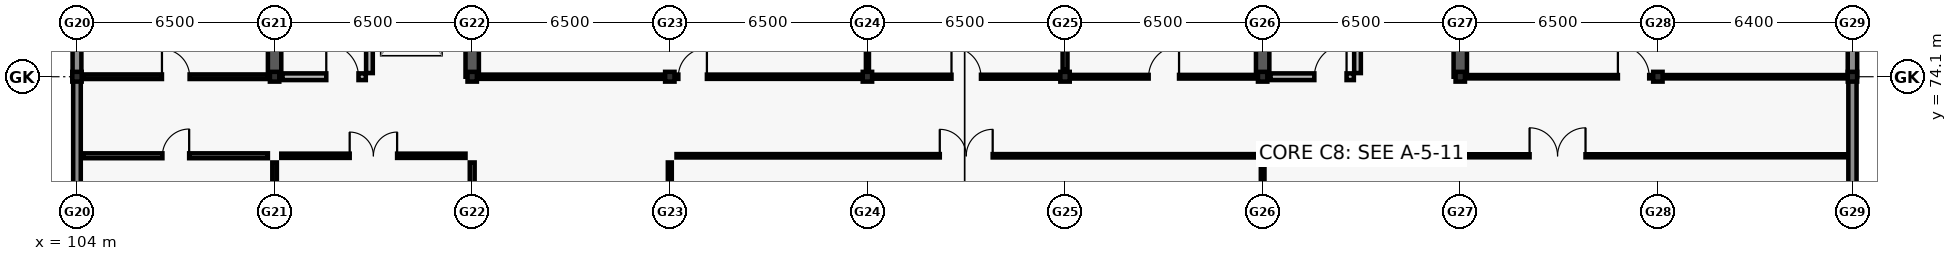
"""IFC4 building model, lengths in metres.
Left out: names, types, materials, properties, quantities, classifications, styles, units other than length and angle.
Written with IfcOpenShell. Run it as: python <this file> out.ifc"""

import sys

from ifc_helpers import new_model, si_unit, direction, frame, frame_2d, origin, origin_2d, place, context, subcontext, project, spatial, rectangle, i_section, extrude, element, fill, save


model = new_model("IFC4")
c1 = context("Model", 3, precision=1e-05, world=origin(), true_north=direction((0.0, 1.0)))
c2 = subcontext(c1, "Body", "Model", "MODEL_VIEW")
j1 = project(units=[si_unit("LENGTHUNIT", "METRE"), si_unit("PLANEANGLEUNIT", "RADIAN")], contexts=[c1])
p1 = place(None, origin())
s1 = spatial("IfcSite", under=j1, at=p1, CompositionType="ELEMENT")
p2 = place(p1, origin())
s2 = spatial("IfcBuilding", under=s1, at=p2, CompositionType="ELEMENT")
p3 = place(p2, frame((0.0, 0.0, 5.4)))
s3 = spatial("IfcBuildingStorey", under=s2, at=p3, CompositionType="ELEMENT", Elevation=5.4)
for number, where, z_axis, x_axis in (
    (1, (104.0, 74.1, 0.0), (0.0, 0.0, 1.0), (1.0, 0.0, 0.0)),
    (2, (110.5, 74.1, 0.0), (0.0, 0.0, 1.0), (1.0, 0.0, 0.0)),
    (3, (117.0, 74.1, 0.0), (0.0, 0.0, 1.0), (1.0, 0.0, 0.0)),
    (4, (123.5, 74.1, 0.0), (0.0, 0.0, 1.0), (1.0, 0.0, 0.0)),
    (5, (130.0, 74.1, 0.0), (0.0, 0.0, 1.0), (1.0, 0.0, 0.0)),
    (6, (136.5, 74.1, 0.0), (0.0, 0.0, 1.0), (1.0, 0.0, 0.0)),
    (7, (143.0, 74.1, 0.0), (0.0, 0.0, 1.0), (1.0, 0.0, 0.0)),
    (8, (149.5, 74.1, 0.0), (0.0, 0.0, 1.0), (1.0, 0.0, 0.0)),
    (9, (156.0, 74.1, 0.0), (0.0, 0.0, 1.0), (1.0, 0.0, 0.0)),
    (10, (162.4, 74.1, 0.0), (0.0, 0.0, 1.0), (1.0, 0.0, 0.0)),
):
    element("IfcColumn", number, at=place(p3, frame(where, z_axis=z_axis, x_axis=x_axis)), inside=s3, PredefinedType="COLUMN", context=c2, shape_type="SweptSolid", body=[
        extrude(i_section(OverallWidth=0.309, OverallDepth=0.321, WebThickness=0.014, FlangeThickness=0.022, FilletRadius=0.017, at=origin_2d()), origin(), (0.0, 0.0, 1.0), 4.2),
    ])
for number, where, z_axis, x_axis in (
    (11, (110.5, 74.1, 0.0), (0.0, 0.0, 1.0), (0.0, 1.0, 0.0)),
    (12, (117.0, 74.1, 0.0), (0.0, 0.0, 1.0), (0.0, 1.0, 0.0)),
    (13, (143.0, 74.1, 0.0), (0.0, 0.0, 1.0), (0.0, 1.0, 0.0)),
    (14, (149.5, 74.1, 0.0), (0.0, 0.0, 1.0), (0.0, 1.0, 0.0)),
):
    element("IfcWall", number, at=place(p3, frame(where, z_axis=z_axis, x_axis=x_axis)), inside=s3, PredefinedType="SHEAR", context=c2, shape_type="SweptSolid", body=[
        extrude(rectangle(XDim=6.68, YDim=0.44, at=frame_2d((3.34, 0.0))), origin(), (0.0, 0.0, 1.0), 3.96),
    ])
p4 = place(p3, frame((104.0, 67.205, 0.0), z_axis=(0.0, 0.0, 1.0), x_axis=(0.0, 1.0, 0.0)))
e15 = element("IfcWall", 15, at=p4, inside=s3, PredefinedType="SOLIDWALL", context=c2, shape_type="SweptSolid", body=[
    extrude(rectangle(XDim=6.89, YDim=0.25, at=frame_2d((3.445, 0.0))), origin(), (0.0, 0.0, 1.0), 3.32),
])
p5 = place(p4, frame((1.512, 0.0, 0.8)))
e16 = element("IfcOpeningElement", 16, at=p5, cuts=e15, PredefinedType="OPENING", context=c2, shape_type="SweptSolid", body=[
    extrude(rectangle(XDim=1.3, YDim=1.8, at=frame_2d((0.65, 0.9))), frame((0.0, 0.135, 0.0), z_axis=(0.0, -1.0, 0.0), x_axis=(1.0, 0.0, 0.0)), (0.0, 0.0, 1.0), 0.27),
])
p6 = place(p3, frame((162.4, 74.095, 0.0), z_axis=(0.0, 0.0, 1.0), x_axis=(0.0, -1.0, 0.0)))
e17 = element("IfcWall", 17, at=p6, inside=s3, PredefinedType="SOLIDWALL", context=c2, shape_type="SweptSolid", body=[
    extrude(rectangle(XDim=6.89, YDim=0.27, at=frame_2d((3.445, 0.0))), origin(), (0.0, 0.0, 1.0), 3.32),
])
p7 = place(p6, frame((4.002, 0.0, 0.8)))
e18 = element("IfcOpeningElement", 18, at=p7, cuts=e17, PredefinedType="OPENING", context=c2, shape_type="SweptSolid", body=[
    extrude(rectangle(XDim=1.45, YDim=1.8, at=frame_2d((0.725, 0.9))), frame((0.0, 0.145, 0.0), z_axis=(0.0, -1.0, 0.0), x_axis=(1.0, 0.0, 0.0)), (0.0, 0.0, 1.0), 0.29),
])
p8 = place(p3, frame((104.0, 74.105, 0.0), z_axis=(0.0, 0.0, 1.0), x_axis=(0.0, 1.0, 0.0)))
e19 = element("IfcWall", 19, at=p8, inside=s3, PredefinedType="SOLIDWALL", context=c2, shape_type="SweptSolid", body=[
    extrude(rectangle(XDim=6.89, YDim=0.29, at=frame_2d((3.445, 0.0))), origin(), (0.0, 0.0, 1.0), 3.32),
])
p9 = place(p8, frame((2.645, 0.0, 0.8)))
e20 = element("IfcOpeningElement", 20, at=p9, cuts=e19, PredefinedType="OPENING", context=c2, shape_type="SweptSolid", body=[
    extrude(rectangle(XDim=1.6, YDim=1.8, at=frame_2d((0.8, 0.9))), frame((0.0, 0.155, 0.0), z_axis=(0.0, -1.0, 0.0), x_axis=(1.0, 0.0, 0.0)), (0.0, 0.0, 1.0), 0.31),
])
p10 = place(p3, frame((162.4, 80.995, 0.0), z_axis=(0.0, 0.0, 1.0), x_axis=(0.0, -1.0, 0.0)))
e21 = element("IfcWall", 21, at=p10, inside=s3, PredefinedType="SOLIDWALL", context=c2, shape_type="SweptSolid", body=[
    extrude(rectangle(XDim=6.89, YDim=0.31, at=frame_2d((3.445, 0.0))), origin(), (0.0, 0.0, 1.0), 3.32),
])
p11 = place(p10, frame((2.845, 0.0, 0.8)))
e22 = element("IfcOpeningElement", 22, at=p11, cuts=e21, PredefinedType="OPENING", context=c2, shape_type="SweptSolid", body=[
    extrude(rectangle(XDim=1.2, YDim=2.05, at=frame_2d((0.6, 1.025))), frame((0.0, 0.165, 0.0), z_axis=(0.0, -1.0, 0.0), x_axis=(1.0, 0.0, 0.0)), (0.0, 0.0, 1.0), 0.33),
])
p12 = place(p3, frame((113.62, 74.22, 0.0), z_axis=(0.0, 0.0, 1.0), x_axis=(0.0, 1.0, 0.0)))
e23 = element("IfcWall", 23, at=p12, inside=s3, PredefinedType="SOLIDWALL", context=c2, shape_type="SweptSolid", body=[
    extrude(rectangle(XDim=6.555, YDim=0.22, at=frame_2d((3.277, 0.0))), origin(), (0.0, 0.0, 1.0), 3.96),
])
p13 = place(p3, frame((110.76, 74.1, 0.0), z_axis=(0.0, 0.0, 1.0), x_axis=(1.0, 0.0, 0.0)))
e24 = element("IfcWall", 24, at=p13, inside=s3, PredefinedType="SOLIDWALL", context=c2, shape_type="SweptSolid", body=[
    extrude(rectangle(XDim=2.74, YDim=0.22, at=frame_2d((1.37, 0.0))), origin(), (0.0, 0.0, 1.0), 3.32),
])
p14 = place(p13, frame((1.44, 0.0, 0.0)))
e25 = element("IfcOpeningElement", 25, at=p14, cuts=e24, PredefinedType="OPENING", context=c2, shape_type="SweptSolid", body=[
    extrude(rectangle(XDim=1.06, YDim=2.1, at=frame_2d((0.53, 1.05))), frame((0.0, 0.12, 0.0), z_axis=(0.0, -1.0, 0.0), x_axis=(1.0, 0.0, 0.0)), (0.0, 0.0, 1.0), 0.24),
])
p15 = place(p3, frame((146.12, 74.22, 0.0), z_axis=(0.0, 0.0, 1.0), x_axis=(0.0, 1.0, 0.0)))
e26 = element("IfcWall", 26, at=p15, inside=s3, PredefinedType="SOLIDWALL", context=c2, shape_type="SweptSolid", body=[
    extrude(rectangle(XDim=6.555, YDim=0.22, at=frame_2d((3.277, 0.0))), origin(), (0.0, 0.0, 1.0), 3.96),
])
p16 = place(p3, frame((143.26, 74.1, 0.0), z_axis=(0.0, 0.0, 1.0), x_axis=(1.0, 0.0, 0.0)))
e27 = element("IfcWall", 27, at=p16, inside=s3, PredefinedType="SOLIDWALL", context=c2, shape_type="SweptSolid", body=[
    extrude(rectangle(XDim=2.74, YDim=0.22, at=frame_2d((1.37, 0.0))), origin(), (0.0, 0.0, 1.0), 3.32),
])
p17 = place(p16, frame((1.44, 0.0, 0.0)))
e28 = element("IfcOpeningElement", 28, at=p17, cuts=e27, PredefinedType="OPENING", context=c2, shape_type="SweptSolid", body=[
    extrude(rectangle(XDim=1.06, YDim=2.1, at=frame_2d((0.53, 1.05))), frame((0.0, 0.12, 0.0), z_axis=(0.0, -1.0, 0.0), x_axis=(1.0, 0.0, 0.0)), (0.0, 0.0, 1.0), 0.24),
])
p18 = place(p3, frame((117.0, 60.52, 0.0), z_axis=(0.0, 0.0, 1.0), x_axis=(0.0, 1.0, 0.0)))
e29 = element("IfcWall", 29, at=p18, inside=s3, PredefinedType="PARTITIONING", context=c2, shape_type="SweptSolid", body=[
    extrude(rectangle(XDim=10.76, YDim=0.16, at=frame_2d((5.38, 0.0))), origin(), (0.0, 0.0, 1.0), 3.3),
])
p19 = place(p18, frame((4.64, 0.0, 0.0)))
e30 = element("IfcOpeningElement", 30, at=p19, cuts=e29, PredefinedType="OPENING", context=c2, shape_type="SweptSolid", body=[
    extrude(rectangle(XDim=1.48, YDim=2.18, at=frame_2d((0.74, 1.09))), frame((0.0, 0.09, 0.0), z_axis=(0.0, -1.0, 0.0), x_axis=(1.0, 0.0, 0.0)), (0.0, 0.0, 1.0), 0.18),
])
p20 = place(p3, frame((110.5, 67.42, 0.0), z_axis=(0.0, 0.0, 1.0), x_axis=(0.0, 1.0, 0.0)))
e31 = element("IfcWall", 31, at=p20, inside=s3, PredefinedType="PARTITIONING", context=c2, shape_type="SweptSolid", body=[
    extrude(rectangle(XDim=3.86, YDim=0.15, at=frame_2d((1.93, 0.0))), origin(), (0.0, 0.0, 1.0), 3.3),
])
p21 = place(p3, frame((110.72, 71.5, 0.0), z_axis=(0.0, 0.0, 1.0), x_axis=(1.0, 0.0, 0.0)))
e32 = element("IfcWall", 32, at=p21, inside=s3, PredefinedType="PARTITIONING", context=c2, shape_type="SweptSolid", body=[
    extrude(rectangle(XDim=6.06, YDim=0.14, at=frame_2d((3.03, 0.0))), origin(), (0.0, 0.0, 1.0), 3.3),
])
p22 = place(p21, frame((2.25, 0.0, 0.0)))
e33 = element("IfcOpeningElement", 33, at=p22, cuts=e32, PredefinedType="OPENING", context=c2, shape_type="SweptSolid", body=[
    extrude(rectangle(XDim=1.56, YDim=2.18, at=frame_2d((0.78, 1.09))), frame((0.0, 0.08, 0.0), z_axis=(0.0, -1.0, 0.0), x_axis=(1.0, 0.0, 0.0)), (0.0, 0.0, 1.0), 0.16),
])
p23 = place(p3, frame((123.5, 60.52, 0.0), z_axis=(0.0, 0.0, 1.0), x_axis=(0.0, 1.0, 0.0)))
e34 = element("IfcWall", 34, at=p23, inside=s3, PredefinedType="PARTITIONING", context=c2, shape_type="SweptSolid", body=[
    extrude(rectangle(XDim=10.76, YDim=0.13, at=frame_2d((5.38, 0.0))), origin(), (0.0, 0.0, 1.0), 3.3),
])
p24 = place(p23, frame((4.56, 0.0, 0.0)))
e35 = element("IfcOpeningElement", 35, at=p24, cuts=e34, PredefinedType="OPENING", context=c2, shape_type="SweptSolid", body=[
    extrude(rectangle(XDim=1.64, YDim=2.2, at=frame_2d((0.82, 1.1))), frame((0.0, 0.075, 0.0), z_axis=(0.0, -1.0, 0.0), x_axis=(1.0, 0.0, 0.0)), (0.0, 0.0, 1.0), 0.15),
])
p25 = place(p3, frame((143.0, 60.52, 0.0), z_axis=(0.0, 0.0, 1.0), x_axis=(0.0, 1.0, 0.0)))
e36 = element("IfcWall", 36, at=p25, inside=s3, PredefinedType="PARTITIONING", context=c2, shape_type="SweptSolid", body=[
    extrude(rectangle(XDim=10.76, YDim=0.12, at=frame_2d((5.38, 0.0))), origin(), (0.0, 0.0, 1.0), 3.3),
])
p26 = place(p3, frame((123.72, 71.5, 0.0), z_axis=(0.0, 0.0, 1.0), x_axis=(1.0, 0.0, 0.0)))
e37 = element("IfcWall", 37, at=p26, inside=s3, PredefinedType="PARTITIONING", context=c2, shape_type="SweptSolid", body=[
    extrude(rectangle(XDim=19.06, YDim=0.11, at=frame_2d((9.53, 0.0))), origin(), (0.0, 0.0, 1.0), 3.3),
])
p27 = place(p26, frame((8.66, 0.0, 0.0)))
e38 = element("IfcOpeningElement", 38, at=p27, cuts=e37, PredefinedType="OPENING", context=c2, shape_type="SweptSolid", body=[
    extrude(rectangle(XDim=1.74, YDim=2.2, at=frame_2d((0.87, 1.1))), frame((0.0, 0.065, 0.0), z_axis=(0.0, -1.0, 0.0), x_axis=(1.0, 0.0, 0.0)), (0.0, 0.0, 1.0), 0.13),
])
p28 = place(p3, frame((143.22, 71.5, 0.0), z_axis=(0.0, 0.0, 1.0), x_axis=(1.0, 0.0, 0.0)))
e39 = element("IfcWall", 39, at=p28, inside=s3, PredefinedType="PARTITIONING", context=c2, shape_type="SweptSolid", body=[
    extrude(rectangle(XDim=18.96, YDim=0.1, at=frame_2d((9.48, 0.0))), origin(), (0.0, 0.0, 1.0), 3.3),
])
p29 = place(p28, frame((8.56, 0.0, 0.0)))
e40 = element("IfcOpeningElement", 40, at=p29, cuts=e39, PredefinedType="OPENING", context=c2, shape_type="SweptSolid", body=[
    extrude(rectangle(XDim=1.84, YDim=2.22, at=frame_2d((0.92, 1.11))), frame((0.0, 0.06, 0.0), z_axis=(0.0, -1.0, 0.0), x_axis=(1.0, 0.0, 0.0)), (0.0, 0.0, 1.0), 0.12),
])
p30 = place(p3, frame((104.22, 71.5, 0.0), z_axis=(0.0, 0.0, 1.0), x_axis=(1.0, 0.0, 0.0)))
e41 = element("IfcWall", 41, at=p30, inside=s3, PredefinedType="PARTITIONING", context=c2, shape_type="SweptSolid", body=[
    extrude(rectangle(XDim=6.06, YDim=0.16, at=frame_2d((3.03, 0.0))), origin(), (0.0, 0.0, 1.0), 3.3),
])
p31 = place(p30, frame((2.59, 0.0, 0.0)))
e42 = element("IfcOpeningElement", 42, at=p31, cuts=e41, PredefinedType="OPENING", context=c2, shape_type="SweptSolid", body=[
    extrude(rectangle(XDim=0.88, YDim=2.04, at=frame_2d((0.44, 1.02))), frame((0.0, 0.09, 0.0), z_axis=(0.0, -1.0, 0.0), x_axis=(1.0, 0.0, 0.0)), (0.0, 0.0, 1.0), 0.18),
])
p32 = place(p3, frame((104.22, 74.1, 0.0), z_axis=(0.0, 0.0, 1.0), x_axis=(1.0, 0.0, 0.0)))
e43 = element("IfcWall", 43, at=p32, inside=s3, PredefinedType="PARTITIONING", context=c2, shape_type="SweptSolid", body=[
    extrude(rectangle(XDim=6.06, YDim=0.15, at=frame_2d((3.03, 0.0))), origin(), (0.0, 0.0, 1.0), 3.3),
])
p33 = place(p32, frame((2.575, 0.0, 0.0)))
e44 = element("IfcOpeningElement", 44, at=p33, cuts=e43, PredefinedType="OPENING", context=c2, shape_type="SweptSolid", body=[
    extrude(rectangle(XDim=0.91, YDim=2.06, at=frame_2d((0.455, 1.03))), frame((0.0, 0.085, 0.0), z_axis=(0.0, -1.0, 0.0), x_axis=(1.0, 0.0, 0.0)), (0.0, 0.0, 1.0), 0.17),
])
p34 = place(p3, frame((117.22, 74.1, 0.0), z_axis=(0.0, 0.0, 1.0), x_axis=(1.0, 0.0, 0.0)))
e45 = element("IfcWall", 45, at=p34, inside=s3, PredefinedType="PARTITIONING", context=c2, shape_type="SweptSolid", body=[
    extrude(rectangle(XDim=12.56, YDim=0.14, at=frame_2d((6.28, 0.0))), origin(), (0.0, 0.0, 1.0), 3.3),
])
p35 = place(p34, frame((6.56, 0.0, 0.0)))
e46 = element("IfcOpeningElement", 46, at=p35, cuts=e45, PredefinedType="OPENING", context=c2, shape_type="SweptSolid", body=[
    extrude(rectangle(XDim=0.94, YDim=2.08, at=frame_2d((0.47, 1.04))), frame((0.0, 0.08, 0.0), z_axis=(0.0, -1.0, 0.0), x_axis=(1.0, 0.0, 0.0)), (0.0, 0.0, 1.0), 0.16),
])
p36 = place(p3, frame((130.22, 74.1, 0.0), z_axis=(0.0, 0.0, 1.0), x_axis=(1.0, 0.0, 0.0)))
e47 = element("IfcWall", 47, at=p36, inside=s3, PredefinedType="PARTITIONING", context=c2, shape_type="SweptSolid", body=[
    extrude(rectangle(XDim=6.06, YDim=0.13, at=frame_2d((3.03, 0.0))), origin(), (0.0, 0.0, 1.0), 3.3),
])
p37 = place(p36, frame((2.545, 0.0, 0.0)))
e48 = element("IfcOpeningElement", 48, at=p37, cuts=e47, PredefinedType="OPENING", context=c2, shape_type="SweptSolid", body=[
    extrude(rectangle(XDim=0.97, YDim=2.1, at=frame_2d((0.485, 1.05))), frame((0.0, 0.075, 0.0), z_axis=(0.0, -1.0, 0.0), x_axis=(1.0, 0.0, 0.0)), (0.0, 0.0, 1.0), 0.15),
])
p38 = place(p3, frame((136.72, 74.1, 0.0), z_axis=(0.0, 0.0, 1.0), x_axis=(1.0, 0.0, 0.0)))
e49 = element("IfcWall", 49, at=p38, inside=s3, PredefinedType="PARTITIONING", context=c2, shape_type="SweptSolid", body=[
    extrude(rectangle(XDim=6.06, YDim=0.12, at=frame_2d((3.03, 0.0))), origin(), (0.0, 0.0, 1.0), 3.3),
])
p39 = place(p38, frame((2.53, 0.0, 0.0)))
e50 = element("IfcOpeningElement", 50, at=p39, cuts=e49, PredefinedType="OPENING", context=c2, shape_type="SweptSolid", body=[
    extrude(rectangle(XDim=1.0, YDim=2.12, at=frame_2d((0.5, 1.06))), frame((0.0, 0.07, 0.0), z_axis=(0.0, -1.0, 0.0), x_axis=(1.0, 0.0, 0.0)), (0.0, 0.0, 1.0), 0.14),
])
p40 = place(p3, frame((149.72, 74.1, 0.0), z_axis=(0.0, 0.0, 1.0), x_axis=(1.0, 0.0, 0.0)))
e51 = element("IfcWall", 51, at=p40, inside=s3, PredefinedType="PARTITIONING", context=c2, shape_type="SweptSolid", body=[
    extrude(rectangle(XDim=12.46, YDim=0.11, at=frame_2d((6.23, 0.0))), origin(), (0.0, 0.0, 1.0), 3.3),
])
p41 = place(p40, frame((4.965, 0.0, 0.0)))
e52 = element("IfcOpeningElement", 52, at=p41, cuts=e51, PredefinedType="OPENING", context=c2, shape_type="SweptSolid", body=[
    extrude(rectangle(XDim=1.03, YDim=2.06, at=frame_2d((0.515, 1.03))), frame((0.0, 0.065, 0.0), z_axis=(0.0, -1.0, 0.0), x_axis=(1.0, 0.0, 0.0)), (0.0, 0.0, 1.0), 0.13),
])
p42 = place(p3, frame((130.0, 74.32, 0.0), z_axis=(0.0, 0.0, 1.0), x_axis=(0.0, 1.0, 0.0)))
e53 = element("IfcWall", 53, at=p42, inside=s3, PredefinedType="PARTITIONING", context=c2, shape_type="SweptSolid", body=[
    extrude(rectangle(XDim=6.46, YDim=0.1, at=frame_2d((3.23, 0.0))), origin(), (0.0, 0.0, 1.0), 3.3),
])
p43 = place(p3, frame((136.5, 74.32, 0.0), z_axis=(0.0, 0.0, 1.0), x_axis=(0.0, 1.0, 0.0)))
e54 = element("IfcWall", 54, at=p43, inside=s3, PredefinedType="PARTITIONING", context=c2, shape_type="SweptSolid", body=[
    extrude(rectangle(XDim=6.46, YDim=0.16, at=frame_2d((3.23, 0.0))), origin(), (0.0, 0.0, 1.0), 3.3),
])
p44 = place(p14, origin())
e55 = element("IfcDoor", 55, at=p44, inside=s3, OperationType="SINGLE_SWING_LEFT", PredefinedType="DOOR", context=c2, shape_type="SweptSolid", body=[
    extrude(rectangle(XDim=1.06, YDim=2.1, at=frame_2d((0.53, 1.05))), frame((0.0, 0.025, 0.0), z_axis=(0.0, -1.0, 0.0), x_axis=(1.0, 0.0, 0.0)), (0.0, 0.0, 1.0), 0.05),
])
fill(e25, e55)
p45 = place(p17, origin())
e56 = element("IfcDoor", 56, at=p45, inside=s3, OperationType="SINGLE_SWING_RIGHT", PredefinedType="DOOR", context=c2, shape_type="SweptSolid", body=[
    extrude(rectangle(XDim=1.06, YDim=2.1, at=frame_2d((0.53, 1.05))), frame((0.0, 0.025, 0.0), z_axis=(0.0, -1.0, 0.0), x_axis=(1.0, 0.0, 0.0)), (0.0, 0.0, 1.0), 0.05),
])
fill(e28, e56)
p46 = place(p22, origin())
e57 = element("IfcDoor", 57, at=p46, inside=s3, OperationType="DOUBLE_DOOR_SINGLE_SWING", PredefinedType="DOOR", context=c2, shape_type="SweptSolid", body=[
    extrude(rectangle(XDim=1.56, YDim=2.18, at=frame_2d((0.78, 1.09))), frame((0.0, 0.025, 0.0), z_axis=(0.0, -1.0, 0.0), x_axis=(1.0, 0.0, 0.0)), (0.0, 0.0, 1.0), 0.05),
])
fill(e33, e57)
p47 = place(p27, origin())
e58 = element("IfcDoor", 58, at=p47, inside=s3, OperationType="DOUBLE_DOOR_SINGLE_SWING", PredefinedType="DOOR", context=c2, shape_type="SweptSolid", body=[
    extrude(rectangle(XDim=1.74, YDim=2.2, at=frame_2d((0.87, 1.1))), frame((0.0, 0.025, 0.0), z_axis=(0.0, -1.0, 0.0), x_axis=(1.0, 0.0, 0.0)), (0.0, 0.0, 1.0), 0.05),
])
fill(e38, e58)
p48 = place(p29, origin())
e59 = element("IfcDoor", 59, at=p48, inside=s3, OperationType="DOUBLE_DOOR_SINGLE_SWING", PredefinedType="DOOR", context=c2, shape_type="SweptSolid", body=[
    extrude(rectangle(XDim=1.84, YDim=2.22, at=frame_2d((0.92, 1.11))), frame((0.0, 0.025, 0.0), z_axis=(0.0, -1.0, 0.0), x_axis=(1.0, 0.0, 0.0)), (0.0, 0.0, 1.0), 0.05),
])
fill(e40, e59)
p49 = place(p31, origin())
e60 = element("IfcDoor", 60, at=p49, inside=s3, OperationType="SINGLE_SWING_RIGHT", PredefinedType="DOOR", context=c2, shape_type="SweptSolid", body=[
    extrude(rectangle(XDim=0.88, YDim=2.04, at=frame_2d((0.44, 1.02))), frame((0.0, 0.025, 0.0), z_axis=(0.0, -1.0, 0.0), x_axis=(1.0, 0.0, 0.0)), (0.0, 0.0, 1.0), 0.05),
])
fill(e42, e60)
p50 = place(p33, origin())
e61 = element("IfcDoor", 61, at=p50, inside=s3, OperationType="SINGLE_SWING_LEFT", PredefinedType="DOOR", context=c2, shape_type="SweptSolid", body=[
    extrude(rectangle(XDim=0.91, YDim=2.06, at=frame_2d((0.455, 1.03))), frame((0.0, 0.025, 0.0), z_axis=(0.0, -1.0, 0.0), x_axis=(1.0, 0.0, 0.0)), (0.0, 0.0, 1.0), 0.05),
])
fill(e44, e61)
p51 = place(p35, origin())
e62 = element("IfcDoor", 62, at=p51, inside=s3, OperationType="SINGLE_SWING_RIGHT", PredefinedType="DOOR", context=c2, shape_type="SweptSolid", body=[
    extrude(rectangle(XDim=0.94, YDim=2.08, at=frame_2d((0.47, 1.04))), frame((0.0, 0.025, 0.0), z_axis=(0.0, -1.0, 0.0), x_axis=(1.0, 0.0, 0.0)), (0.0, 0.0, 1.0), 0.05),
])
fill(e46, e62)
p52 = place(p37, origin())
e63 = element("IfcDoor", 63, at=p52, inside=s3, OperationType="SINGLE_SWING_LEFT", PredefinedType="DOOR", context=c2, shape_type="SweptSolid", body=[
    extrude(rectangle(XDim=0.97, YDim=2.1, at=frame_2d((0.485, 1.05))), frame((0.0, 0.025, 0.0), z_axis=(0.0, -1.0, 0.0), x_axis=(1.0, 0.0, 0.0)), (0.0, 0.0, 1.0), 0.05),
])
fill(e48, e63)
p53 = place(p39, origin())
e64 = element("IfcDoor", 64, at=p53, inside=s3, OperationType="SINGLE_SWING_RIGHT", PredefinedType="DOOR", context=c2, shape_type="SweptSolid", body=[
    extrude(rectangle(XDim=1.0, YDim=2.12, at=frame_2d((0.5, 1.06))), frame((0.0, 0.025, 0.0), z_axis=(0.0, -1.0, 0.0), x_axis=(1.0, 0.0, 0.0)), (0.0, 0.0, 1.0), 0.05),
])
fill(e50, e64)
p54 = place(p41, origin())
e65 = element("IfcDoor", 65, at=p54, inside=s3, OperationType="SINGLE_SWING_LEFT", PredefinedType="DOOR", context=c2, shape_type="SweptSolid", body=[
    extrude(rectangle(XDim=1.03, YDim=2.06, at=frame_2d((0.515, 1.03))), frame((0.0, 0.025, 0.0), z_axis=(0.0, -1.0, 0.0), x_axis=(1.0, 0.0, 0.0)), (0.0, 0.0, 1.0), 0.05),
])
fill(e52, e65)
save(model, sys.argv[1])
